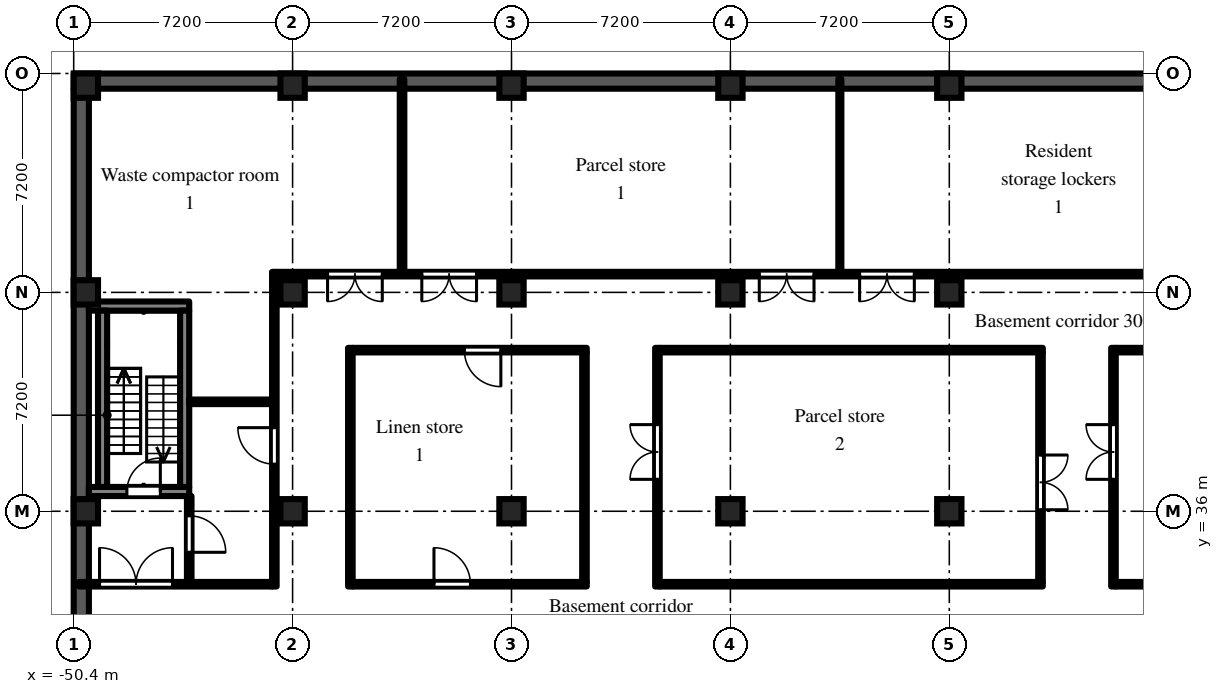
"""IFC4 building model, lengths in metres.
Left out: names, types, materials, properties, quantities, classifications, styles, units other than length and angle.
Written with IfcOpenShell. Run it as: python <this file> out.ifc"""

import sys

from ifc_helpers import new_model, si_unit, direction, frame, frame_2d, origin, origin_2d, place, context, subcontext, project, spatial, rectangle, extrude, element, fill, save


model = new_model("IFC4")
c1 = context("Model", 3, precision=1e-05, world=origin(), true_north=direction((0.0, 1.0)))
c2 = subcontext(c1, "Body", "Model", "MODEL_VIEW")
j1 = project(units=[si_unit("LENGTHUNIT", "METRE"), si_unit("PLANEANGLEUNIT", "RADIAN")], contexts=[c1])
p1 = place(None, origin())
s1 = spatial("IfcSite", under=j1, at=p1, CompositionType="ELEMENT")
p2 = place(p1, origin())
s2 = spatial("IfcBuilding", under=s1, at=p2, CompositionType="ELEMENT")
p3 = place(p2, frame((0.0, 0.0, -4.8)))
s3 = spatial("IfcBuildingStorey", under=s2, at=p3, CompositionType="ELEMENT", Elevation=-4.8)
p4 = place(p3, frame((-50.4, 50.15, -0.5), z_axis=(0.0, 0.0, 1.0), x_axis=(1.0, 0.0, 0.0)))
e1 = element("IfcWall", 1, at=p4, inside=s3, PredefinedType="SOLIDWALL", context=c2, shape_type="SweptSolid", body=[
    extrude(rectangle(XDim=100.8, YDim=0.5, at=frame_2d((50.4, 0.0))), origin(), (0.0, 0.0, 1.0), 5.3),
])
p5 = place(p3, frame((-50.15, -49.9, -0.5), z_axis=(0.0, 0.0, 1.0), x_axis=(0.0, 1.0, 0.0)))
e2 = element("IfcWall", 2, at=p5, inside=s3, PredefinedType="SOLIDWALL", context=c2, shape_type="SweptSolid", body=[
    extrude(rectangle(XDim=99.8, YDim=0.5, at=frame_2d((49.9, 0.0))), origin(), (0.0, 0.0, 1.0), 5.3),
])
for number, where, z_axis, x_axis in (
    (3, (-50.0, 36.0, -0.5), (0.0, 0.0, 1.0), (1.0, 0.0, 0.0)),
    (4, (-50.0, 43.2, -0.5), (0.0, 0.0, 1.0), (1.0, 0.0, 0.0)),
    (5, (-50.0, 50.0, -0.5), (0.0, 0.0, 1.0), (1.0, 0.0, 0.0)),
    (6, (-43.2, 36.0, -0.5), (0.0, 0.0, 1.0), (1.0, 0.0, 0.0)),
    (7, (-43.2, 43.2, -0.5), (0.0, 0.0, 1.0), (1.0, 0.0, 0.0)),
    (8, (-43.2, 50.0, -0.5), (0.0, 0.0, 1.0), (1.0, 0.0, 0.0)),
    (9, (-36.0, 36.0, -0.5), (0.0, 0.0, 1.0), (1.0, 0.0, 0.0)),
    (10, (-36.0, 43.2, -0.5), (0.0, 0.0, 1.0), (1.0, 0.0, 0.0)),
    (11, (-36.0, 50.0, -0.5), (0.0, 0.0, 1.0), (1.0, 0.0, 0.0)),
    (12, (-28.8, 36.0, -0.5), (0.0, 0.0, 1.0), (1.0, 0.0, 0.0)),
    (13, (-28.8, 43.2, -0.5), (0.0, 0.0, 1.0), (1.0, 0.0, 0.0)),
    (14, (-28.8, 50.0, -0.5), (0.0, 0.0, 1.0), (1.0, 0.0, 0.0)),
    (15, (-21.6, 36.0, -0.5), (0.0, 0.0, 1.0), (1.0, 0.0, 0.0)),
    (16, (-21.6, 43.2, -0.5), (0.0, 0.0, 1.0), (1.0, 0.0, 0.0)),
    (17, (-21.6, 50.0, -0.5), (0.0, 0.0, 1.0), (1.0, 0.0, 0.0)),
):
    element("IfcColumn", number, at=place(p3, frame(where, z_axis=z_axis, x_axis=x_axis)), inside=s3, PredefinedType="COLUMN", context=c2, shape_type="SweptSolid", body=[
        extrude(rectangle(XDim=0.8, YDim=0.8, at=origin_2d()), origin(), (0.0, 0.0, 1.0), 5.3),
    ])
p6 = place(p3, frame((-49.9, 36.65, 0.0), z_axis=(0.0, 0.0, 1.0), x_axis=(1.0, 0.0, 0.0)))
e18 = element("IfcWall", 18, at=p6, inside=s3, PredefinedType="SHEAR", context=c2, shape_type="SweptSolid", body=[
    extrude(rectangle(XDim=3.3, YDim=0.3, at=frame_2d((1.65, 0.0))), origin(), (0.0, 0.0, 1.0), 4.35),
])
p7 = place(p6, frame((1.25, 0.0, 0.0)))
e19 = element("IfcOpeningElement", 19, at=p7, cuts=e18, PredefinedType="OPENING", context=c2, shape_type="SweptSolid", body=[
    extrude(rectangle(XDim=1.1, YDim=2.1, at=frame_2d((0.55, 1.05))), frame((0.0, 0.16, 0.0), z_axis=(0.0, -1.0, 0.0), x_axis=(1.0, 0.0, 0.0)), (0.0, 0.0, 1.0), 0.32),
])
p8 = place(p3, frame((-49.9, 42.75, 0.0), z_axis=(0.0, 0.0, 1.0), x_axis=(1.0, 0.0, 0.0)))
e20 = element("IfcWall", 20, at=p8, inside=s3, PredefinedType="SHEAR", context=c2, shape_type="SweptSolid", body=[
    extrude(rectangle(XDim=3.3, YDim=0.3, at=frame_2d((1.65, 0.0))), origin(), (0.0, 0.0, 1.0), 4.35),
])
for number, where, z_axis, x_axis in (
    (21, (-49.45, 36.8, 0.0), (0.0, 0.0, 1.0), (0.0, 1.0, 0.0)),
    (22, (-46.75, 36.8, 0.0), (0.0, 0.0, 1.0), (0.0, 1.0, 0.0)),
):
    element("IfcWall", number, at=place(p3, frame(where, z_axis=z_axis, x_axis=x_axis)), inside=s3, PredefinedType="SHEAR", context=c2, shape_type="SweptSolid", body=[
        extrude(rectangle(XDim=5.8, YDim=0.3, at=frame_2d((2.9, 0.0))), origin(), (0.0, 0.0, 1.0), 4.35),
    ])
p9 = place(p3, frame((-50.22, 33.6, 0.0), z_axis=(0.0, 0.0, 1.0), x_axis=(1.0, 0.0, 0.0)))
e23 = element("IfcWall", 23, at=p9, inside=s3, PredefinedType="PARTITIONING", context=c2, shape_type="SweptSolid", body=[
    extrude(rectangle(XDim=6.345, YDim=0.15, at=frame_2d((3.172, 0.0))), origin(), (0.0, 0.0, 1.0), 4.35),
])
p10 = place(p9, frame((0.67, 0.0, 0.0)))
e24 = element("IfcOpeningElement", 24, at=p10, cuts=e23, PredefinedType="OPENING", context=c2, shape_type="SweptSolid", body=[
    extrude(rectangle(XDim=2.4, YDim=2.1, at=frame_2d((1.2, 1.05))), frame((0.0, 0.085, 0.0), z_axis=(0.0, -1.0, 0.0), x_axis=(1.0, 0.0, 0.0)), (0.0, 0.0, 1.0), 0.17),
])
p11 = place(p3, frame((-46.6, 33.675, 0.0), z_axis=(0.0, 0.0, 1.0), x_axis=(0.0, 1.0, 0.0)))
e25 = element("IfcWall", 25, at=p11, inside=s3, PredefinedType="PARTITIONING", context=c2, shape_type="SweptSolid", body=[
    extrude(rectangle(XDim=2.825, YDim=0.15, at=frame_2d((1.413, 0.0))), origin(), (0.0, 0.0, 1.0), 4.35),
])
p12 = place(p11, frame((0.975, 0.0, 0.0)))
e26 = element("IfcOpeningElement", 26, at=p12, cuts=e25, PredefinedType="OPENING", context=c2, shape_type="SweptSolid", body=[
    extrude(rectangle(XDim=1.2, YDim=2.1, at=frame_2d((0.6, 1.05))), frame((0.0, 0.085, 0.0), z_axis=(0.0, -1.0, 0.0), x_axis=(1.0, 0.0, 0.0)), (0.0, 0.0, 1.0), 0.17),
])
p13 = place(p3, frame((-46.6, 39.6, 0.0), z_axis=(0.0, 0.0, 1.0), x_axis=(1.0, 0.0, 0.0)))
e27 = element("IfcWall", 27, at=p13, inside=s3, PredefinedType="PARTITIONING", context=c2, shape_type="SweptSolid", body=[
    extrude(rectangle(XDim=2.725, YDim=0.15, at=frame_2d((1.363, 0.0))), origin(), (0.0, 0.0, 1.0), 4.35),
])
p14 = place(p3, frame((-43.8, 33.525, 0.0), z_axis=(0.0, 0.0, 1.0), x_axis=(0.0, 1.0, 0.0)))
e28 = element("IfcWall", 28, at=p14, inside=s3, PredefinedType="PARTITIONING", context=c2, shape_type="SweptSolid", body=[
    extrude(rectangle(XDim=10.35, YDim=0.15, at=frame_2d((5.175, 0.0))), origin(), (0.0, 0.0, 1.0), 4.35),
])
p15 = place(p14, frame((4.025, 0.0, 0.0)))
e29 = element("IfcOpeningElement", 29, at=p15, cuts=e28, PredefinedType="OPENING", context=c2, shape_type="SweptSolid", body=[
    extrude(rectangle(XDim=1.2, YDim=2.1, at=frame_2d((0.6, 1.05))), frame((0.0, 0.085, 0.0), z_axis=(0.0, -1.0, 0.0), x_axis=(1.0, 0.0, 0.0)), (0.0, 0.0, 1.0), 0.17),
])
p16 = place(p3, frame((-43.725, 43.8, 0.0), z_axis=(0.0, 0.0, 1.0), x_axis=(1.0, 0.0, 0.0)))
e30 = element("IfcWall", 30, at=p16, inside=s3, PredefinedType="PARTITIONING", context=c2, shape_type="SweptSolid", body=[
    extrude(rectangle(XDim=42.3, YDim=0.15, at=frame_2d((21.15, 0.0))), origin(), (0.0, 0.0, 1.0), 4.35),
])
p17 = place(p16, frame((4.775, 0.0, 0.0)))
e31 = element("IfcOpeningElement", 31, at=p17, cuts=e30, PredefinedType="OPENING", context=c2, shape_type="SweptSolid", body=[
    extrude(rectangle(XDim=1.8, YDim=2.1, at=frame_2d((0.9, 1.05))), frame((0.0, 0.085, 0.0), z_axis=(0.0, -1.0, 0.0), x_axis=(1.0, 0.0, 0.0)), (0.0, 0.0, 1.0), 0.17),
])
p18 = place(p16, frame((15.875, 0.0, 0.0)))
e32 = element("IfcOpeningElement", 32, at=p18, cuts=e30, PredefinedType="OPENING", context=c2, shape_type="SweptSolid", body=[
    extrude(rectangle(XDim=1.8, YDim=2.1, at=frame_2d((0.9, 1.05))), frame((0.0, 0.085, 0.0), z_axis=(0.0, -1.0, 0.0), x_axis=(1.0, 0.0, 0.0)), (0.0, 0.0, 1.0), 0.17),
])
p19 = place(p16, frame((19.175, 0.0, 0.0)))
e33 = element("IfcOpeningElement", 33, at=p19, cuts=e30, PredefinedType="OPENING", context=c2, shape_type="SweptSolid", body=[
    extrude(rectangle(XDim=1.8, YDim=2.1, at=frame_2d((0.9, 1.05))), frame((0.0, 0.085, 0.0), z_axis=(0.0, -1.0, 0.0), x_axis=(1.0, 0.0, 0.0)), (0.0, 0.0, 1.0), 0.17),
])
p20 = place(p16, frame((30.275, 0.0, 0.0)))
e34 = element("IfcOpeningElement", 34, at=p20, cuts=e30, PredefinedType="OPENING", context=c2, shape_type="SweptSolid", body=[
    extrude(rectangle(XDim=1.8, YDim=2.1, at=frame_2d((0.9, 1.05))), frame((0.0, 0.085, 0.0), z_axis=(0.0, -1.0, 0.0), x_axis=(1.0, 0.0, 0.0)), (0.0, 0.0, 1.0), 0.17),
])
p21 = place(p16, frame((36.925, 0.0, 0.0)))
e35 = element("IfcOpeningElement", 35, at=p21, cuts=e30, PredefinedType="OPENING", context=c2, shape_type="SweptSolid", body=[
    extrude(rectangle(XDim=1.2, YDim=2.1, at=frame_2d((0.6, 1.05))), frame((0.0, 0.085, 0.0), z_axis=(0.0, -1.0, 0.0), x_axis=(1.0, 0.0, 0.0)), (0.0, 0.0, 1.0), 0.17),
])
p22 = place(p16, frame((38.325, 0.0, 0.0)))
e36 = element("IfcOpeningElement", 36, at=p22, cuts=e30, PredefinedType="OPENING", context=c2, shape_type="SweptSolid", body=[
    extrude(rectangle(XDim=1.8, YDim=2.1, at=frame_2d((0.9, 1.05))), frame((0.0, 0.085, 0.0), z_axis=(0.0, -1.0, 0.0), x_axis=(1.0, 0.0, 0.0)), (0.0, 0.0, 1.0), 0.17),
])
p23 = place(p16, frame((1.675, 0.0, 0.0)))
e37 = element("IfcOpeningElement", 37, at=p23, cuts=e30, PredefinedType="OPENING", context=c2, shape_type="SweptSolid", body=[
    extrude(rectangle(XDim=1.8, YDim=2.1, at=frame_2d((0.9, 1.05))), frame((0.0, 0.085, 0.0), z_axis=(0.0, -1.0, 0.0), x_axis=(1.0, 0.0, 0.0)), (0.0, 0.0, 1.0), 0.17),
])
p24 = place(p3, frame((-41.3, 33.525, 0.0), z_axis=(0.0, 0.0, 1.0), x_axis=(0.0, 1.0, 0.0)))
e38 = element("IfcWall", 38, at=p24, inside=s3, PredefinedType="PARTITIONING", context=c2, shape_type="SweptSolid", body=[
    extrude(rectangle(XDim=7.85, YDim=0.15, at=frame_2d((3.925, 0.0))), origin(), (0.0, 0.0, 1.0), 4.35),
])
p25 = place(p3, frame((-41.225, 33.6, 0.0), z_axis=(0.0, 0.0, 1.0), x_axis=(1.0, 0.0, 0.0)))
e39 = element("IfcWall", 39, at=p25, inside=s3, PredefinedType="PARTITIONING", context=c2, shape_type="SweptSolid", body=[
    extrude(rectangle(XDim=7.7, YDim=0.15, at=frame_2d((3.85, 0.0))), origin(), (0.0, 0.0, 1.0), 4.35),
])
p26 = place(p25, frame((2.675, 0.0, 0.0)))
e40 = element("IfcOpeningElement", 40, at=p26, cuts=e39, PredefinedType="OPENING", context=c2, shape_type="SweptSolid", body=[
    extrude(rectangle(XDim=1.2, YDim=2.1, at=frame_2d((0.6, 1.05))), frame((0.0, 0.085, 0.0), z_axis=(0.0, -1.0, 0.0), x_axis=(1.0, 0.0, 0.0)), (0.0, 0.0, 1.0), 0.17),
])
p27 = place(p3, frame((-41.225, 41.3, 0.0), z_axis=(0.0, 0.0, 1.0), x_axis=(1.0, 0.0, 0.0)))
e41 = element("IfcWall", 41, at=p27, inside=s3, PredefinedType="PARTITIONING", context=c2, shape_type="SweptSolid", body=[
    extrude(rectangle(XDim=7.7, YDim=0.15, at=frame_2d((3.85, 0.0))), origin(), (0.0, 0.0, 1.0), 4.35),
])
p28 = place(p27, frame((3.675, 0.0, 0.0)))
e42 = element("IfcOpeningElement", 42, at=p28, cuts=e41, PredefinedType="OPENING", context=c2, shape_type="SweptSolid", body=[
    extrude(rectangle(XDim=1.2, YDim=2.1, at=frame_2d((0.6, 1.05))), frame((0.0, 0.085, 0.0), z_axis=(0.0, -1.0, 0.0), x_axis=(1.0, 0.0, 0.0)), (0.0, 0.0, 1.0), 0.17),
])
p29 = place(p3, frame((-39.6, 43.875, 0.0), z_axis=(0.0, 0.0, 1.0), x_axis=(0.0, 1.0, 0.0)))
e43 = element("IfcWall", 43, at=p29, inside=s3, PredefinedType="PARTITIONING", context=c2, shape_type="SweptSolid", body=[
    extrude(rectangle(XDim=6.345, YDim=0.15, at=frame_2d((3.172, 0.0))), origin(), (0.0, 0.0, 1.0), 4.35),
])
p30 = place(p3, frame((-33.6, 33.675, 0.0), z_axis=(0.0, 0.0, 1.0), x_axis=(0.0, 1.0, 0.0)))
e44 = element("IfcWall", 44, at=p30, inside=s3, PredefinedType="PARTITIONING", context=c2, shape_type="SweptSolid", body=[
    extrude(rectangle(XDim=7.55, YDim=0.15, at=frame_2d((3.775, 0.0))), origin(), (0.0, 0.0, 1.0), 4.35),
])
p31 = place(p3, frame((-31.2, 33.525, 0.0), z_axis=(0.0, 0.0, 1.0), x_axis=(0.0, 1.0, 0.0)))
e45 = element("IfcWall", 45, at=p31, inside=s3, PredefinedType="PARTITIONING", context=c2, shape_type="SweptSolid", body=[
    extrude(rectangle(XDim=7.85, YDim=0.15, at=frame_2d((3.925, 0.0))), origin(), (0.0, 0.0, 1.0), 4.35),
])
p32 = place(p31, frame((3.525, 0.0, 0.0)))
e46 = element("IfcOpeningElement", 46, at=p32, cuts=e45, PredefinedType="OPENING", context=c2, shape_type="SweptSolid", body=[
    extrude(rectangle(XDim=1.8, YDim=2.1, at=frame_2d((0.9, 1.05))), frame((0.0, 0.085, 0.0), z_axis=(0.0, -1.0, 0.0), x_axis=(1.0, 0.0, 0.0)), (0.0, 0.0, 1.0), 0.17),
])
for number, where, z_axis, x_axis in (
    (47, (-31.125, 33.6, 0.0), (0.0, 0.0, 1.0), (1.0, 0.0, 0.0)),
    (48, (-31.125, 41.3, 0.0), (0.0, 0.0, 1.0), (1.0, 0.0, 0.0)),
):
    element("IfcWall", number, at=place(p3, frame(where, z_axis=z_axis, x_axis=x_axis)), inside=s3, PredefinedType="PARTITIONING", context=c2, shape_type="SweptSolid", body=[
        extrude(rectangle(XDim=12.6, YDim=0.15, at=frame_2d((6.3, 0.0))), origin(), (0.0, 0.0, 1.0), 4.35),
    ])
p33 = place(p3, frame((-25.2, 43.875, 0.0), z_axis=(0.0, 0.0, 1.0), x_axis=(0.0, 1.0, 0.0)))
e49 = element("IfcWall", 49, at=p33, inside=s3, PredefinedType="PARTITIONING", context=c2, shape_type="SweptSolid", body=[
    extrude(rectangle(XDim=6.345, YDim=0.1, at=frame_2d((3.172, 0.0))), origin(), (0.0, 0.0, 1.0), 4.35),
])
p34 = place(p3, frame((-18.6, 33.675, 0.0), z_axis=(0.0, 0.0, 1.0), x_axis=(0.0, 1.0, 0.0)))
e50 = element("IfcWall", 50, at=p34, inside=s3, PredefinedType="PARTITIONING", context=c2, shape_type="SweptSolid", body=[
    extrude(rectangle(XDim=7.55, YDim=0.15, at=frame_2d((3.775, 0.0))), origin(), (0.0, 0.0, 1.0), 4.35),
])
p35 = place(p34, frame((2.375, 0.0, 0.0)))
e51 = element("IfcOpeningElement", 51, at=p35, cuts=e50, PredefinedType="OPENING", context=c2, shape_type="SweptSolid", body=[
    extrude(rectangle(XDim=1.8, YDim=2.1, at=frame_2d((0.9, 1.05))), frame((0.0, 0.085, 0.0), z_axis=(0.0, -1.0, 0.0), x_axis=(1.0, 0.0, 0.0)), (0.0, 0.0, 1.0), 0.17),
])
p36 = place(p3, frame((-16.2, 33.525, 0.0), z_axis=(0.0, 0.0, 1.0), x_axis=(0.0, 1.0, 0.0)))
e52 = element("IfcWall", 52, at=p36, inside=s3, PredefinedType="PARTITIONING", context=c2, shape_type="SweptSolid", body=[
    extrude(rectangle(XDim=7.85, YDim=0.15, at=frame_2d((3.925, 0.0))), origin(), (0.0, 0.0, 1.0), 4.35),
])
p37 = place(p36, frame((3.525, 0.0, 0.0)))
e53 = element("IfcOpeningElement", 53, at=p37, cuts=e52, PredefinedType="OPENING", context=c2, shape_type="SweptSolid", body=[
    extrude(rectangle(XDim=1.8, YDim=2.1, at=frame_2d((0.9, 1.05))), frame((0.0, 0.085, 0.0), z_axis=(0.0, -1.0, 0.0), x_axis=(1.0, 0.0, 0.0)), (0.0, 0.0, 1.0), 0.17),
])
p38 = place(p3, frame((-16.125, 33.6, 0.0), z_axis=(0.0, 0.0, 1.0), x_axis=(1.0, 0.0, 0.0)))
e54 = element("IfcWall", 54, at=p38, inside=s3, PredefinedType="PARTITIONING", context=c2, shape_type="SweptSolid", body=[
    extrude(rectangle(XDim=15.0, YDim=0.15, at=frame_2d((7.5, 0.0))), origin(), (0.0, 0.0, 1.0), 4.35),
])
p39 = place(p38, frame((12.275, 0.0, 0.0)))
e55 = element("IfcOpeningElement", 55, at=p39, cuts=e54, PredefinedType="OPENING", context=c2, shape_type="SweptSolid", body=[
    extrude(rectangle(XDim=1.8, YDim=2.1, at=frame_2d((0.9, 1.05))), frame((0.0, 0.085, 0.0), z_axis=(0.0, -1.0, 0.0), x_axis=(1.0, 0.0, 0.0)), (0.0, 0.0, 1.0), 0.17),
])
p40 = place(p3, frame((-16.125, 41.3, 0.0), z_axis=(0.0, 0.0, 1.0), x_axis=(1.0, 0.0, 0.0)))
e56 = element("IfcWall", 56, at=p40, inside=s3, PredefinedType="PARTITIONING", context=c2, shape_type="SweptSolid", body=[
    extrude(rectangle(XDim=14.625, YDim=0.15, at=frame_2d((7.312, 0.0))), origin(), (0.0, 0.0, 1.0), 4.35),
])
p41 = place(p40, frame((10.725, 0.0, 0.0)))
e57 = element("IfcOpeningElement", 57, at=p41, cuts=e56, PredefinedType="OPENING", context=c2, shape_type="SweptSolid", body=[
    extrude(rectangle(XDim=1.8, YDim=2.1, at=frame_2d((0.9, 1.05))), frame((0.0, 0.085, 0.0), z_axis=(0.0, -1.0, 0.0), x_axis=(1.0, 0.0, 0.0)), (0.0, 0.0, 1.0), 0.17),
])
p42 = place(p7, origin())
e58 = element("IfcDoor", 58, at=p42, inside=s3, OperationType="SINGLE_SWING_RIGHT", PredefinedType="DOOR", context=c2, shape_type="SweptSolid", body=[
    extrude(rectangle(XDim=1.1, YDim=2.1, at=frame_2d((0.55, 1.05))), frame((0.0, 0.025, 0.0), z_axis=(0.0, -1.0, 0.0), x_axis=(1.0, 0.0, 0.0)), (0.0, 0.0, 1.0), 0.05),
])
fill(e19, e58)
p43 = place(p10, origin())
e59 = element("IfcDoor", 59, at=p43, inside=s3, OperationType="DOUBLE_DOOR_DOUBLE_SWING", PredefinedType="DOOR", context=c2, shape_type="SweptSolid", body=[
    extrude(rectangle(XDim=2.4, YDim=2.1, at=frame_2d((1.2, 1.05))), frame((0.0, 0.025, 0.0), z_axis=(0.0, -1.0, 0.0), x_axis=(1.0, 0.0, 0.0)), (0.0, 0.0, 1.0), 0.05),
])
fill(e24, e59)
p44 = place(p17, frame((1.8, 0.0, 0.0), z_axis=(0.0, 0.0, 1.0), x_axis=(-1.0, 0.0, 0.0)))
e60 = element("IfcDoor", 60, at=p44, inside=s3, OperationType="DOUBLE_DOOR_DOUBLE_SWING", PredefinedType="DOOR", context=c2, shape_type="SweptSolid", body=[
    extrude(rectangle(XDim=1.8, YDim=2.1, at=frame_2d((0.9, 1.05))), frame((0.0, 0.025, 0.0), z_axis=(0.0, -1.0, 0.0), x_axis=(1.0, 0.0, 0.0)), (0.0, 0.0, 1.0), 0.05),
])
fill(e31, e60)
p45 = place(p18, frame((1.8, 0.0, 0.0), z_axis=(0.0, 0.0, 1.0), x_axis=(-1.0, 0.0, 0.0)))
e61 = element("IfcDoor", 61, at=p45, inside=s3, OperationType="DOUBLE_DOOR_DOUBLE_SWING", PredefinedType="DOOR", context=c2, shape_type="SweptSolid", body=[
    extrude(rectangle(XDim=1.8, YDim=2.1, at=frame_2d((0.9, 1.05))), frame((0.0, 0.025, 0.0), z_axis=(0.0, -1.0, 0.0), x_axis=(1.0, 0.0, 0.0)), (0.0, 0.0, 1.0), 0.05),
])
fill(e32, e61)
p46 = place(p19, frame((1.8, 0.0, 0.0), z_axis=(0.0, 0.0, 1.0), x_axis=(-1.0, 0.0, 0.0)))
e62 = element("IfcDoor", 62, at=p46, inside=s3, OperationType="DOUBLE_DOOR_DOUBLE_SWING", PredefinedType="DOOR", context=c2, shape_type="SweptSolid", body=[
    extrude(rectangle(XDim=1.8, YDim=2.1, at=frame_2d((0.9, 1.05))), frame((0.0, 0.025, 0.0), z_axis=(0.0, -1.0, 0.0), x_axis=(1.0, 0.0, 0.0)), (0.0, 0.0, 1.0), 0.05),
])
fill(e33, e62)
p47 = place(p23, frame((1.8, 0.0, 0.0), z_axis=(0.0, 0.0, 1.0), x_axis=(-1.0, 0.0, 0.0)))
e63 = element("IfcDoor", 63, at=p47, inside=s3, OperationType="DOUBLE_DOOR_DOUBLE_SWING", PredefinedType="DOOR", context=c2, shape_type="SweptSolid", body=[
    extrude(rectangle(XDim=1.8, YDim=2.1, at=frame_2d((0.9, 1.05))), frame((0.0, 0.025, 0.0), z_axis=(0.0, -1.0, 0.0), x_axis=(1.0, 0.0, 0.0)), (0.0, 0.0, 1.0), 0.05),
])
fill(e37, e63)
p48 = place(p12, frame((1.2, 0.0, 0.0), z_axis=(0.0, 0.0, 1.0), x_axis=(-1.0, 0.0, 0.0)))
e64 = element("IfcDoor", 64, at=p48, inside=s3, OperationType="SINGLE_SWING_RIGHT", PredefinedType="DOOR", context=c2, shape_type="SweptSolid", body=[
    extrude(rectangle(XDim=1.2, YDim=2.1, at=frame_2d((0.6, 1.05))), frame((0.0, 0.025, 0.0), z_axis=(0.0, -1.0, 0.0), x_axis=(1.0, 0.0, 0.0)), (0.0, 0.0, 1.0), 0.05),
])
fill(e26, e64)
p49 = place(p15, origin())
e65 = element("IfcDoor", 65, at=p49, inside=s3, OperationType="SINGLE_SWING_RIGHT", PredefinedType="DOOR", context=c2, shape_type="SweptSolid", body=[
    extrude(rectangle(XDim=1.2, YDim=2.1, at=frame_2d((0.6, 1.05))), frame((0.0, 0.025, 0.0), z_axis=(0.0, -1.0, 0.0), x_axis=(1.0, 0.0, 0.0)), (0.0, 0.0, 1.0), 0.05),
])
fill(e29, e65)
p50 = place(p26, origin())
e66 = element("IfcDoor", 66, at=p50, inside=s3, OperationType="SINGLE_SWING_LEFT", PredefinedType="DOOR", context=c2, shape_type="SweptSolid", body=[
    extrude(rectangle(XDim=1.2, YDim=2.1, at=frame_2d((0.6, 1.05))), frame((0.0, 0.025, 0.0), z_axis=(0.0, -1.0, 0.0), x_axis=(1.0, 0.0, 0.0)), (0.0, 0.0, 1.0), 0.05),
])
fill(e40, e66)
p51 = place(p28, frame((1.2, 0.0, 0.0), z_axis=(0.0, 0.0, 1.0), x_axis=(-1.0, 0.0, 0.0)))
e67 = element("IfcDoor", 67, at=p51, inside=s3, OperationType="SINGLE_SWING_LEFT", PredefinedType="DOOR", context=c2, shape_type="SweptSolid", body=[
    extrude(rectangle(XDim=1.2, YDim=2.1, at=frame_2d((0.6, 1.05))), frame((0.0, 0.025, 0.0), z_axis=(0.0, -1.0, 0.0), x_axis=(1.0, 0.0, 0.0)), (0.0, 0.0, 1.0), 0.05),
])
fill(e42, e67)
p52 = place(p32, origin())
e68 = element("IfcDoor", 68, at=p52, inside=s3, OperationType="DOUBLE_DOOR_DOUBLE_SWING", PredefinedType="DOOR", context=c2, shape_type="SweptSolid", body=[
    extrude(rectangle(XDim=1.8, YDim=2.1, at=frame_2d((0.9, 1.05))), frame((0.0, 0.025, 0.0), z_axis=(0.0, -1.0, 0.0), x_axis=(1.0, 0.0, 0.0)), (0.0, 0.0, 1.0), 0.05),
])
fill(e46, e68)
p53 = place(p35, frame((1.8, 0.0, 0.0), z_axis=(0.0, 0.0, 1.0), x_axis=(-1.0, 0.0, 0.0)))
e69 = element("IfcDoor", 69, at=p53, inside=s3, OperationType="DOUBLE_DOOR_DOUBLE_SWING", PredefinedType="DOOR", context=c2, shape_type="SweptSolid", body=[
    extrude(rectangle(XDim=1.8, YDim=2.1, at=frame_2d((0.9, 1.05))), frame((0.0, 0.025, 0.0), z_axis=(0.0, -1.0, 0.0), x_axis=(1.0, 0.0, 0.0)), (0.0, 0.0, 1.0), 0.05),
])
fill(e51, e69)
p54 = place(p37, origin())
e70 = element("IfcDoor", 70, at=p54, inside=s3, OperationType="DOUBLE_DOOR_DOUBLE_SWING", PredefinedType="DOOR", context=c2, shape_type="SweptSolid", body=[
    extrude(rectangle(XDim=1.8, YDim=2.1, at=frame_2d((0.9, 1.05))), frame((0.0, 0.025, 0.0), z_axis=(0.0, -1.0, 0.0), x_axis=(1.0, 0.0, 0.0)), (0.0, 0.0, 1.0), 0.05),
])
fill(e53, e70)
save(model, sys.argv[1])
